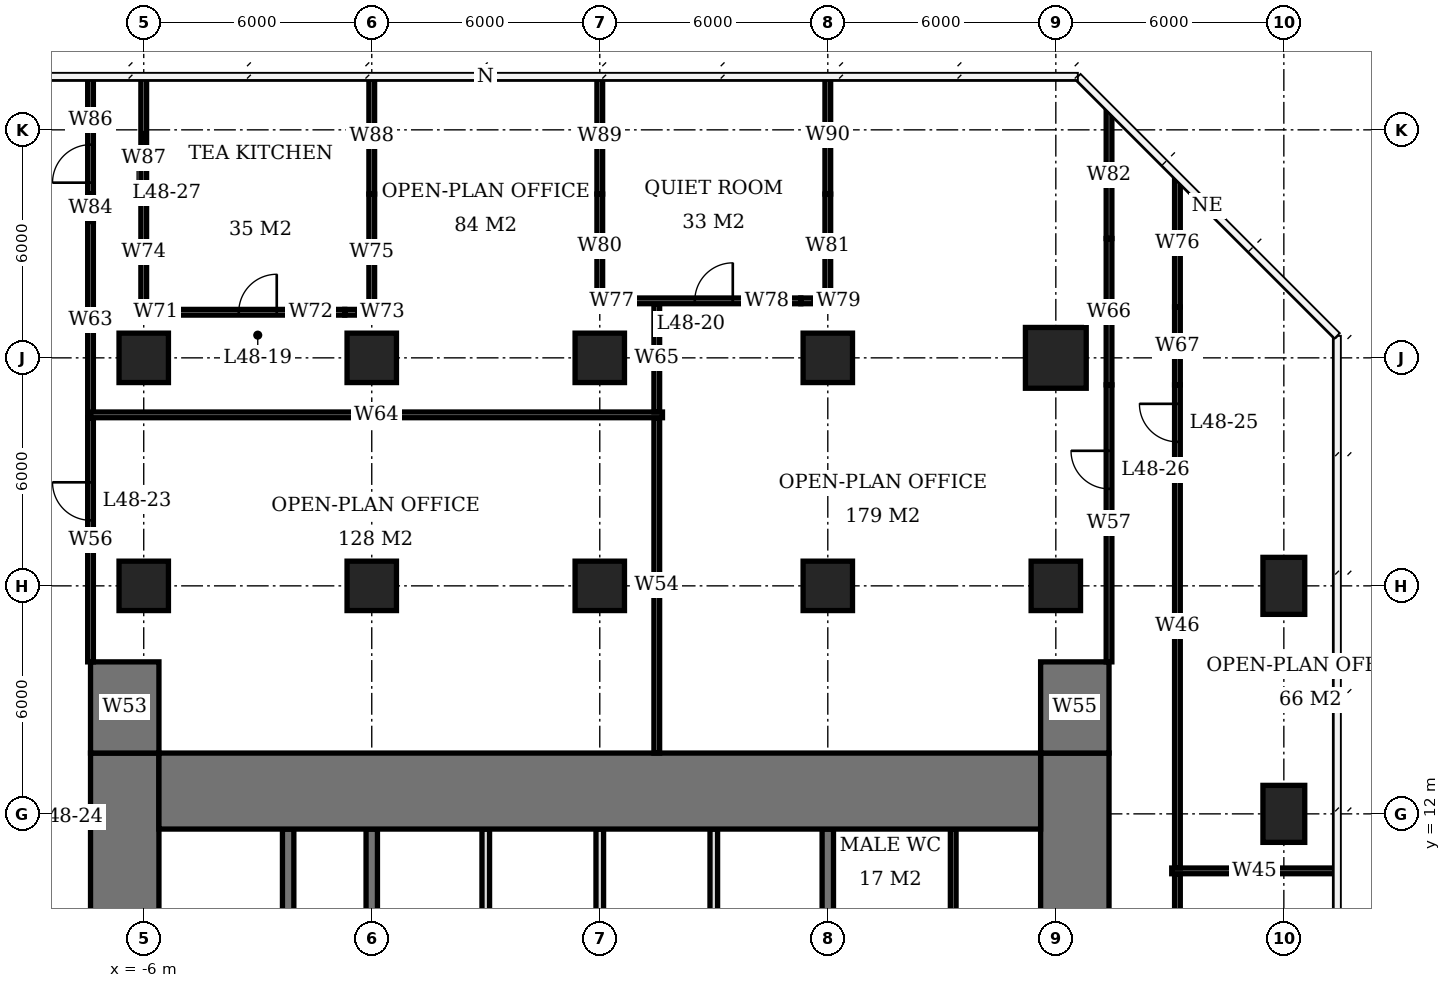
"""IFC4 building model, lengths in metres.
Left out: names, types, materials, properties, quantities, classifications, styles, units other than length and angle.
Written with IfcOpenShell. Run it as: python <this file> out.ifc"""

import sys

from ifc_helpers import new_model, si_unit, direction, frame, frame_2d, origin, origin_2d, place, context, subcontext, project, spatial, rectangle, extrude, element, fill, save


model = new_model("IFC4")
c1 = context("Model", 3, precision=1e-05, world=origin(), true_north=direction((0.0, 1.0)))
c2 = subcontext(c1, "Body", "Model", "MODEL_VIEW")
j1 = project(units=[si_unit("LENGTHUNIT", "METRE"), si_unit("PLANEANGLEUNIT", "RADIAN")], contexts=[c1])
p1 = place(None, origin())
s1 = spatial("IfcSite", under=j1, at=p1, CompositionType="ELEMENT")
p2 = place(p1, origin())
s2 = spatial("IfcBuilding", under=s1, at=p2, CompositionType="ELEMENT")
p3 = place(p2, frame((0.0, 0.0, 196.7)))
s3 = spatial("IfcBuildingStorey", under=s2, at=p3, CompositionType="ELEMENT", Elevation=196.7)
for number, where, z_axis, x_axis in (
    (1, (-6.0, 18.0, 0.0), (0.0, 0.0, 1.0), (1.0, 0.0, 0.0)),
    (2, (-6.0, 24.0, 0.0), (0.0, 0.0, 1.0), (1.0, 0.0, 0.0)),
    (3, (0.0, 18.0, 0.0), (0.0, 0.0, 1.0), (1.0, 0.0, 0.0)),
    (4, (0.0, 24.0, 0.0), (0.0, 0.0, 1.0), (1.0, 0.0, 0.0)),
    (5, (6.0, 18.0, 0.0), (0.0, 0.0, 1.0), (1.0, 0.0, 0.0)),
    (6, (6.0, 24.0, 0.0), (0.0, 0.0, 1.0), (1.0, 0.0, 0.0)),
    (7, (12.0, 18.0, 0.0), (0.0, 0.0, 1.0), (1.0, 0.0, 0.0)),
    (8, (12.0, 24.0, 0.0), (0.0, 0.0, 1.0), (1.0, 0.0, 0.0)),
    (9, (18.0, 18.0, 0.0), (0.0, 0.0, 1.0), (1.0, 0.0, 0.0)),
):
    element("IfcColumn", number, at=place(p3, frame(where, z_axis=z_axis, x_axis=x_axis)), inside=s3, PredefinedType="COLUMN", context=c2, shape_type="SweptSolid", body=[
        extrude(rectangle(XDim=1.3, YDim=1.3, at=origin_2d()), origin(), (0.0, 0.0, 1.0), 3.9),
    ])
p4 = place(p3, frame((18.0, 24.0, 0.0), z_axis=(0.0, 0.0, 1.0), x_axis=(1.0, 0.0, 0.0)))
e10 = element("IfcColumn", 10, at=p4, inside=s3, PredefinedType="COLUMN", context=c2, shape_type="SweptSolid", body=[
    extrude(rectangle(XDim=1.6, YDim=1.6, at=origin_2d()), origin(), (0.0, 0.0, 1.0), 3.9),
])
for number, where, z_axis, x_axis in (
    (11, (24.0, 12.0, 0.0), (0.0, 0.0, 1.0), (0.0, 1.0, 0.0)),
    (12, (24.0, 18.0, 0.0), (0.0, 0.0, 1.0), (0.0, 1.0, 0.0)),
):
    element("IfcColumn", number, at=place(p3, frame(where, z_axis=z_axis, x_axis=x_axis)), inside=s3, PredefinedType="COLUMN", context=c2, shape_type="SweptSolid", body=[
        extrude(rectangle(XDim=1.5, YDim=1.1, at=origin_2d()), origin(), (0.0, 0.0, 1.0), 3.9),
    ])
p5 = place(p3, frame((-5.6, 12.6, 0.0), z_axis=(0.0, 0.0, 1.0), x_axis=(1.0, 0.0, 0.0)))
e13 = element("IfcWall", 13, at=p5, inside=s3, PredefinedType="SHEAR", context=c2, shape_type="SweptSolid", body=[
    extrude(rectangle(XDim=23.2, YDim=2.0, at=frame_2d((11.6, 0.0))), origin(), (0.0, 0.0, 1.0), 3.9),
])
p6 = place(p3, frame((-6.5, -7.6, 0.0), z_axis=(0.0, 0.0, 1.0), x_axis=(0.0, 1.0, 0.0)))
e14 = element("IfcWall", 14, at=p6, inside=s3, PredefinedType="SHEAR", context=c2, shape_type="SweptSolid", body=[
    extrude(rectangle(XDim=21.2, YDim=1.8, at=frame_2d((10.6, 0.0))), origin(), (0.0, 0.0, 1.0), 3.9),
])
p7 = place(p6, frame((7.8, 0.0, 0.0)))
e15 = element("IfcOpeningElement", 15, at=p7, cuts=e14, PredefinedType="OPENING", context=c2, shape_type="SweptSolid", body=[
    extrude(rectangle(XDim=1.8, YDim=2.4, at=frame_2d((0.9, 1.2))), frame((0.0, 0.91, 0.0), z_axis=(0.0, -1.0, 0.0), x_axis=(1.0, 0.0, 0.0)), (0.0, 0.0, 1.0), 1.82),
])
p8 = place(p3, frame((18.5, -7.6, 0.0), z_axis=(0.0, 0.0, 1.0), x_axis=(0.0, 1.0, 0.0)))
e16 = element("IfcWall", 16, at=p8, inside=s3, PredefinedType="SHEAR", context=c2, shape_type="SweptSolid", body=[
    extrude(rectangle(XDim=21.2, YDim=1.8, at=frame_2d((10.6, 0.0))), origin(), (0.0, 0.0, 1.0), 3.9),
])
p9 = place(p8, frame((9.2, 0.0, 0.0)))
e17 = element("IfcOpeningElement", 17, at=p9, cuts=e16, PredefinedType="OPENING", context=c2, shape_type="SweptSolid", body=[
    extrude(rectangle(XDim=1.8, YDim=2.4, at=frame_2d((0.9, 1.2))), frame((0.0, 0.91, 0.0), z_axis=(0.0, -1.0, 0.0), x_axis=(1.0, 0.0, 0.0)), (0.0, 0.0, 1.0), 1.82),
])
for number, where, z_axis, x_axis in (
    (18, (-6.5, 13.6, 0.0), (0.0, 0.0, 1.0), (0.0, 1.0, 0.0)),
    (19, (18.5, 13.6, 0.0), (0.0, 0.0, 1.0), (0.0, 1.0, 0.0)),
):
    element("IfcWall", number, at=place(p3, frame(where, z_axis=z_axis, x_axis=x_axis)), inside=s3, PredefinedType="SHEAR", context=c2, shape_type="SweptSolid", body=[
        extrude(rectangle(XDim=2.4, YDim=1.8, at=frame_2d((1.2, 0.0))), origin(), (0.0, 0.0, 1.0), 3.9),
    ])
p10 = place(p3, frame((0.0, 3.15, 0.0), z_axis=(0.0, 0.0, 1.0), x_axis=(0.0, 1.0, 0.0)))
e20 = element("IfcWall", 20, at=p10, inside=s3, PredefinedType="SHEAR", context=c2, shape_type="SweptSolid", body=[
    extrude(rectangle(XDim=8.45, YDim=0.3, at=frame_2d((4.225, 0.0))), origin(), (0.0, 0.0, 1.0), 3.9),
])
p11 = place(p3, frame((12.0, 6.15, 0.0), z_axis=(0.0, 0.0, 1.0), x_axis=(0.0, 1.0, 0.0)))
e21 = element("IfcWall", 21, at=p11, inside=s3, PredefinedType="SHEAR", context=c2, shape_type="SweptSolid", body=[
    extrude(rectangle(XDim=5.45, YDim=0.3, at=frame_2d((2.725, 0.0))), origin(), (0.0, 0.0, 1.0), 3.9),
])
p12 = place(p3, frame((-2.2, 3.15, 0.0), z_axis=(0.0, 0.0, 1.0), x_axis=(0.0, 1.0, 0.0)))
e22 = element("IfcWall", 22, at=p12, inside=s3, PredefinedType="SHEAR", context=c2, shape_type="SweptSolid", body=[
    extrude(rectangle(XDim=8.45, YDim=0.3, at=frame_2d((4.225, 0.0))), origin(), (0.0, 0.0, 1.0), 3.9),
])
for number, where, z_axis, x_axis in (
    (23, (3.0, 6.15, 0.0), (0.0, 0.0, 1.0), (0.0, 1.0, 0.0)),
    (24, (6.0, 6.15, 0.0), (0.0, 0.0, 1.0), (0.0, 1.0, 0.0)),
    (25, (9.0, 6.15, 0.0), (0.0, 0.0, 1.0), (0.0, 1.0, 0.0)),
):
    element("IfcWall", number, at=place(p3, frame(where, z_axis=z_axis, x_axis=x_axis)), inside=s3, PredefinedType="SOLIDWALL", context=c2, shape_type="SweptSolid", body=[
        extrude(rectangle(XDim=5.45, YDim=0.2, at=frame_2d((2.725, 0.0))), origin(), (0.0, 0.0, 1.0), 3.9),
    ])
p13 = place(p3, frame((15.3, 6.15, 0.0), z_axis=(0.0, 0.0, 1.0), x_axis=(0.0, 1.0, 0.0)))
e26 = element("IfcWall", 26, at=p13, inside=s3, PredefinedType="PLUMBINGWALL", context=c2, shape_type="SweptSolid", body=[
    extrude(rectangle(XDim=5.45, YDim=0.15, at=frame_2d((2.725, 0.0))), origin(), (0.0, 0.0, 1.0), 3.65),
])
p14 = place(p3, frame((-6.075, 25.2, 0.0), z_axis=(0.0, 0.0, 1.0), x_axis=(1.0, 0.0, 0.0)))
e27 = element("IfcWall", 27, at=p14, inside=s3, PredefinedType="PARTITIONING", context=c2, shape_type="SweptSolid", body=[
    extrude(rectangle(XDim=0.785, YDim=0.15, at=frame_2d((0.393, 0.0))), origin(), (0.0, 0.0, 1.0), 2.65),
])
p15 = place(p3, frame((-5.29, 25.2, 0.0), z_axis=(0.0, 0.0, 1.0), x_axis=(1.0, 0.0, 0.0)))
e28 = element("IfcWall", 28, at=p15, inside=s3, PredefinedType="PARTITIONING", context=c2, shape_type="SweptSolid", body=[
    extrude(rectangle(XDim=4.58, YDim=0.15, at=frame_2d((2.29, 0.0))), origin(), (0.0, 0.0, 1.0), 3.65),
])
p16 = place(p15, frame((1.79, 0.0, 0.0)))
e29 = element("IfcOpeningElement", 29, at=p16, cuts=e28, PredefinedType="OPENING", context=c2, shape_type="SweptSolid", body=[
    extrude(rectangle(XDim=1.0, YDim=2.1, at=frame_2d((0.5, 1.05))), frame((0.0, 0.085, 0.0), z_axis=(0.0, -1.0, 0.0), x_axis=(1.0, 0.0, 0.0)), (0.0, 0.0, 1.0), 0.17),
])
for number, where, z_axis, x_axis in (
    (30, (-0.71, 25.2, 0.0), (0.0, 0.0, 1.0), (1.0, 0.0, 0.0)),
    (31, (5.925, 25.5, 0.0), (0.0, 0.0, 1.0), (1.0, 0.0, 0.0)),
):
    element("IfcWall", number, at=place(p3, frame(where, z_axis=z_axis, x_axis=x_axis)), inside=s3, PredefinedType="PARTITIONING", context=c2, shape_type="SweptSolid", body=[
        extrude(rectangle(XDim=0.785, YDim=0.15, at=frame_2d((0.393, 0.0))), origin(), (0.0, 0.0, 1.0), 2.65),
    ])
p17 = place(p3, frame((6.71, 25.5, 0.0), z_axis=(0.0, 0.0, 1.0), x_axis=(1.0, 0.0, 0.0)))
e32 = element("IfcWall", 32, at=p17, inside=s3, PredefinedType="PARTITIONING", context=c2, shape_type="SweptSolid", body=[
    extrude(rectangle(XDim=4.58, YDim=0.15, at=frame_2d((2.29, 0.0))), origin(), (0.0, 0.0, 1.0), 3.65),
])
p18 = place(p17, frame((1.79, 0.0, 0.0)))
e33 = element("IfcOpeningElement", 33, at=p18, cuts=e32, PredefinedType="OPENING", context=c2, shape_type="SweptSolid", body=[
    extrude(rectangle(XDim=1.0, YDim=2.1, at=frame_2d((0.5, 1.05))), frame((0.0, 0.085, 0.0), z_axis=(0.0, -1.0, 0.0), x_axis=(1.0, 0.0, 0.0)), (0.0, 0.0, 1.0), 0.17),
])
p19 = place(p3, frame((11.29, 25.5, 0.0), z_axis=(0.0, 0.0, 1.0), x_axis=(1.0, 0.0, 0.0)))
e34 = element("IfcWall", 34, at=p19, inside=s3, PredefinedType="PARTITIONING", context=c2, shape_type="SweptSolid", body=[
    extrude(rectangle(XDim=0.785, YDim=0.15, at=frame_2d((0.393, 0.0))), origin(), (0.0, 0.0, 1.0), 2.65),
])
p20 = place(p3, frame((-6.0, 25.275, 0.0), z_axis=(0.0, 0.0, 1.0), x_axis=(0.0, 1.0, 0.0)))
e35 = element("IfcWall", 35, at=p20, inside=s3, PredefinedType="PARTITIONING", context=c2, shape_type="SweptSolid", body=[
    extrude(rectangle(XDim=3.035, YDim=0.15, at=frame_2d((1.518, 0.0))), origin(), (0.0, 0.0, 1.0), 2.65),
])
p21 = place(p3, frame((-6.0, 28.31, 0.0), z_axis=(0.0, 0.0, 1.0), x_axis=(0.0, 1.0, 0.0)))
e36 = element("IfcWall", 36, at=p21, inside=s3, PredefinedType="PARTITIONING", context=c2, shape_type="SweptSolid", body=[
    extrude(rectangle(XDim=3.09, YDim=0.15, at=frame_2d((1.545, 0.0))), origin(), (0.0, 0.0, 1.0), 3.65),
])
p22 = place(p3, frame((0.0, 25.275, 0.0), z_axis=(0.0, 0.0, 1.0), x_axis=(0.0, 1.0, 0.0)))
e37 = element("IfcWall", 37, at=p22, inside=s3, PredefinedType="PARTITIONING", context=c2, shape_type="SweptSolid", body=[
    extrude(rectangle(XDim=3.035, YDim=0.15, at=frame_2d((1.518, 0.0))), origin(), (0.0, 0.0, 1.0), 2.65),
])
p23 = place(p3, frame((0.0, 28.31, 0.0), z_axis=(0.0, 0.0, 1.0), x_axis=(0.0, 1.0, 0.0)))
e38 = element("IfcWall", 38, at=p23, inside=s3, PredefinedType="PARTITIONING", context=c2, shape_type="SweptSolid", body=[
    extrude(rectangle(XDim=3.04, YDim=0.15, at=frame_2d((1.52, 0.0))), origin(), (0.0, 0.0, 1.0), 3.65),
])
p24 = place(p3, frame((6.0, 25.575, 0.0), z_axis=(0.0, 0.0, 1.0), x_axis=(0.0, 1.0, 0.0)))
e39 = element("IfcWall", 39, at=p24, inside=s3, PredefinedType="PARTITIONING", context=c2, shape_type="SweptSolid", body=[
    extrude(rectangle(XDim=2.735, YDim=0.15, at=frame_2d((1.368, 0.0))), origin(), (0.0, 0.0, 1.0), 2.65),
])
p25 = place(p3, frame((6.0, 28.31, 0.0), z_axis=(0.0, 0.0, 1.0), x_axis=(0.0, 1.0, 0.0)))
e40 = element("IfcWall", 40, at=p25, inside=s3, PredefinedType="PARTITIONING", context=c2, shape_type="SweptSolid", body=[
    extrude(rectangle(XDim=3.04, YDim=0.15, at=frame_2d((1.52, 0.0))), origin(), (0.0, 0.0, 1.0), 3.65),
])
p26 = place(p3, frame((12.0, 25.575, 0.0), z_axis=(0.0, 0.0, 1.0), x_axis=(0.0, 1.0, 0.0)))
e41 = element("IfcWall", 41, at=p26, inside=s3, PredefinedType="PARTITIONING", context=c2, shape_type="SweptSolid", body=[
    extrude(rectangle(XDim=2.735, YDim=0.15, at=frame_2d((1.368, 0.0))), origin(), (0.0, 0.0, 1.0), 2.65),
])
p27 = place(p3, frame((12.0, 28.31, 0.0), z_axis=(0.0, 0.0, 1.0), x_axis=(0.0, 1.0, 0.0)))
e42 = element("IfcWall", 42, at=p27, inside=s3, PredefinedType="PARTITIONING", context=c2, shape_type="SweptSolid", body=[
    extrude(rectangle(XDim=3.09, YDim=0.15, at=frame_2d((1.545, 0.0))), origin(), (0.0, 0.0, 1.0), 3.65),
])
p28 = place(p3, frame((-7.4, 16.0, 0.0), z_axis=(0.0, 0.0, 1.0), x_axis=(0.0, 1.0, 0.0)))
e43 = element("IfcWall", 43, at=p28, inside=s3, PredefinedType="PARTITIONING", context=c2, shape_type="SweptSolid", body=[
    extrude(rectangle(XDim=6.425, YDim=0.15, at=frame_2d((3.212, 0.0))), origin(), (0.0, 0.0, 1.0), 3.65),
])
p29 = place(p28, frame((3.725, 0.0, 0.0)))
e44 = element("IfcOpeningElement", 44, at=p29, cuts=e43, PredefinedType="OPENING", context=c2, shape_type="SweptSolid", body=[
    extrude(rectangle(XDim=1.0, YDim=2.1, at=frame_2d((0.5, 1.05))), frame((0.0, 0.085, 0.0), z_axis=(0.0, -1.0, 0.0), x_axis=(1.0, 0.0, 0.0)), (0.0, 0.0, 1.0), 0.17),
])
p30 = place(p3, frame((-7.4, 22.425, 0.0), z_axis=(0.0, 0.0, 1.0), x_axis=(0.0, 1.0, 0.0)))
e45 = element("IfcWall", 45, at=p30, inside=s3, PredefinedType="PARTITIONING", context=c2, shape_type="SweptSolid", body=[
    extrude(rectangle(XDim=5.165, YDim=0.15, at=frame_2d((2.583, 0.0))), origin(), (0.0, 0.0, 1.0), 3.65),
])
p31 = place(p3, frame((-7.4, 27.59, 0.0), z_axis=(0.0, 0.0, 1.0), x_axis=(0.0, 1.0, 0.0)))
e46 = element("IfcWall", 46, at=p31, inside=s3, PredefinedType="PARTITIONING", context=c2, shape_type="SweptSolid", body=[
    extrude(rectangle(XDim=0.72, YDim=0.15, at=frame_2d((0.36, 0.0))), origin(), (0.0, 0.0, 1.0), 2.65),
])
p32 = place(p3, frame((-7.4, 28.31, 0.0), z_axis=(0.0, 0.0, 1.0), x_axis=(0.0, 1.0, 0.0)))
e47 = element("IfcWall", 47, at=p32, inside=s3, PredefinedType="PARTITIONING", context=c2, shape_type="SweptSolid", body=[
    extrude(rectangle(XDim=3.09, YDim=0.15, at=frame_2d((1.545, 0.0))), origin(), (0.0, 0.0, 1.0), 3.65),
])
p33 = place(p32, frame((0.3, 0.0, 0.0)))
e48 = element("IfcOpeningElement", 48, at=p33, cuts=e47, PredefinedType="OPENING", context=c2, shape_type="SweptSolid", body=[
    extrude(rectangle(XDim=1.0, YDim=2.1, at=frame_2d((0.5, 1.05))), frame((0.0, 0.085, 0.0), z_axis=(0.0, -1.0, 0.0), x_axis=(1.0, 0.0, 0.0)), (0.0, 0.0, 1.0), 0.17),
])
p34 = place(p3, frame((-7.4, 22.5, 0.0), z_axis=(0.0, 0.0, 1.0), x_axis=(1.0, 0.0, 0.0)))
e49 = element("IfcWall", 49, at=p34, inside=s3, PredefinedType="PARTITIONING", context=c2, shape_type="SweptSolid", body=[
    extrude(rectangle(XDim=15.05, YDim=0.15, at=frame_2d((7.525, 0.0))), origin(), (0.0, 0.0, 1.0), 3.65),
])
p35 = place(p3, frame((7.5, 13.6, 0.0), z_axis=(0.0, 0.0, 1.0), x_axis=(0.0, 1.0, 0.0)))
e50 = element("IfcWall", 50, at=p35, inside=s3, PredefinedType="PARTITIONING", context=c2, shape_type="SweptSolid", body=[
    extrude(rectangle(XDim=8.825, YDim=0.15, at=frame_2d((4.413, 0.0))), origin(), (0.0, 0.0, 1.0), 3.65),
])
p36 = place(p3, frame((7.5, 22.575, 0.0), z_axis=(0.0, 0.0, 1.0), x_axis=(0.0, 1.0, 0.0)))
e51 = element("IfcWall", 51, at=p36, inside=s3, PredefinedType="PARTITIONING", context=c2, shape_type="SweptSolid", body=[
    extrude(rectangle(XDim=2.85, YDim=0.15, at=frame_2d((1.425, 0.0))), origin(), (0.0, 0.0, 1.0), 3.65),
])
p37 = place(p3, frame((19.4, 16.0, 0.0), z_axis=(0.0, 0.0, 1.0), x_axis=(0.0, 1.0, 0.0)))
e52 = element("IfcWall", 52, at=p37, inside=s3, PredefinedType="PARTITIONING", context=c2, shape_type="SweptSolid", body=[
    extrude(rectangle(XDim=7.29, YDim=0.15, at=frame_2d((3.645, 0.0))), origin(), (0.0, 0.0, 1.0), 3.65),
])
p38 = place(p37, frame((4.554, 0.0, 0.0)))
e53 = element("IfcOpeningElement", 53, at=p38, cuts=e52, PredefinedType="OPENING", context=c2, shape_type="SweptSolid", body=[
    extrude(rectangle(XDim=1.0, YDim=2.1, at=frame_2d((0.5, 1.05))), frame((0.0, 0.085, 0.0), z_axis=(0.0, -1.0, 0.0), x_axis=(1.0, 0.0, 0.0)), (0.0, 0.0, 1.0), 0.17),
])
p39 = place(p3, frame((19.4, 23.29, 0.0), z_axis=(0.0, 0.0, 1.0), x_axis=(0.0, 1.0, 0.0)))
e54 = element("IfcWall", 54, at=p39, inside=s3, PredefinedType="PARTITIONING", context=c2, shape_type="SweptSolid", body=[
    extrude(rectangle(XDim=3.85, YDim=0.15, at=frame_2d((1.925, 0.0))), origin(), (0.0, 0.0, 1.0), 2.65),
])
p40 = place(p3, frame((19.4, 27.14, 0.0), z_axis=(0.0, 0.0, 1.0), x_axis=(0.0, 1.0, 0.0)))
e55 = element("IfcWall", 55, at=p40, inside=s3, PredefinedType="PARTITIONING", context=c2, shape_type="SweptSolid", body=[
    extrude(rectangle(XDim=3.349, YDim=0.15, at=frame_2d((1.675, 0.0))), origin(), (0.0, 0.0, 1.0), 3.65),
])
p41 = place(p3, frame((21.2, -10.689, 0.0), z_axis=(0.0, 0.0, 1.0), x_axis=(0.0, 1.0, 0.0)))
e56 = element("IfcWall", 56, at=p41, inside=s3, PredefinedType="PARTITIONING", context=c2, shape_type="SweptSolid", body=[
    extrude(rectangle(XDim=21.114, YDim=0.15, at=frame_2d((10.557, 0.0))), origin(), (0.0, 0.0, 1.0), 3.65),
])
p42 = place(p41, frame((13.29, 0.0, 0.0)))
e57 = element("IfcOpeningElement", 57, at=p42, cuts=e56, PredefinedType="OPENING", context=c2, shape_type="SweptSolid", body=[
    extrude(rectangle(XDim=1.0, YDim=2.1, at=frame_2d((0.5, 1.05))), frame((0.0, 0.085, 0.0), z_axis=(0.0, -1.0, 0.0), x_axis=(1.0, 0.0, 0.0)), (0.0, 0.0, 1.0), 0.17),
])
p43 = place(p3, frame((21.2, 10.575, 0.0), z_axis=(0.0, 0.0, 1.0), x_axis=(0.0, 1.0, 0.0)))
e58 = element("IfcWall", 58, at=p43, inside=s3, PredefinedType="PARTITIONING", context=c2, shape_type="SweptSolid", body=[
    extrude(rectangle(XDim=12.715, YDim=0.15, at=frame_2d((6.357, 0.0))), origin(), (0.0, 0.0, 1.0), 3.65),
])
p44 = place(p43, frame((11.215, 0.0, 0.0)))
e59 = element("IfcOpeningElement", 59, at=p44, cuts=e58, PredefinedType="OPENING", context=c2, shape_type="SweptSolid", body=[
    extrude(rectangle(XDim=1.0, YDim=2.1, at=frame_2d((0.5, 1.05))), frame((0.0, 0.085, 0.0), z_axis=(0.0, -1.0, 0.0), x_axis=(1.0, 0.0, 0.0)), (0.0, 0.0, 1.0), 0.17),
])
p45 = place(p3, frame((21.2, 23.29, 0.0), z_axis=(0.0, 0.0, 1.0), x_axis=(0.0, 1.0, 0.0)))
e60 = element("IfcWall", 60, at=p45, inside=s3, PredefinedType="PARTITIONING", context=c2, shape_type="SweptSolid", body=[
    extrude(rectangle(XDim=2.05, YDim=0.15, at=frame_2d((1.025, 0.0))), origin(), (0.0, 0.0, 1.0), 2.65),
])
p46 = place(p3, frame((21.2, 25.34, 0.0), z_axis=(0.0, 0.0, 1.0), x_axis=(0.0, 1.0, 0.0)))
e61 = element("IfcWall", 61, at=p46, inside=s3, PredefinedType="PARTITIONING", context=c2, shape_type="SweptSolid", body=[
    extrude(rectangle(XDim=3.349, YDim=0.15, at=frame_2d((1.674, 0.0))), origin(), (0.0, 0.0, 1.0), 3.65),
])
p47 = place(p3, frame((21.05, 10.5, 0.0), z_axis=(0.0, 0.0, 1.0), x_axis=(1.0, 0.0, 0.0)))
e62 = element("IfcWall", 62, at=p47, inside=s3, PredefinedType="PARTITIONING", context=c2, shape_type="SweptSolid", body=[
    extrude(rectangle(XDim=4.35, YDim=0.15, at=frame_2d((2.175, 0.0))), origin(), (0.0, 0.0, 1.0), 3.65),
])
p48 = place(p16, origin())
e63 = element("IfcDoor", 63, at=p48, inside=s3, OperationType="SINGLE_SWING_RIGHT", PredefinedType="DOOR", context=c2, shape_type="SweptSolid", body=[
    extrude(rectangle(XDim=1.0, YDim=2.1, at=frame_2d((0.5, 1.05))), frame((0.0, 0.025, 0.0), z_axis=(0.0, -1.0, 0.0), x_axis=(1.0, 0.0, 0.0)), (0.0, 0.0, 1.0), 0.05),
])
fill(e29, e63)
p49 = place(p18, origin())
e64 = element("IfcDoor", 64, at=p49, inside=s3, OperationType="SINGLE_SWING_RIGHT", PredefinedType="DOOR", context=c2, shape_type="SweptSolid", body=[
    extrude(rectangle(XDim=1.0, YDim=2.1, at=frame_2d((0.5, 1.05))), frame((0.0, 0.025, 0.0), z_axis=(0.0, -1.0, 0.0), x_axis=(1.0, 0.0, 0.0)), (0.0, 0.0, 1.0), 0.05),
])
fill(e33, e64)
p50 = place(p29, origin())
e65 = element("IfcDoor", 65, at=p50, inside=s3, OperationType="SINGLE_SWING_RIGHT", PredefinedType="DOOR", context=c2, shape_type="SweptSolid", body=[
    extrude(rectangle(XDim=1.0, YDim=2.1, at=frame_2d((0.5, 1.05))), frame((0.0, 0.025, 0.0), z_axis=(0.0, -1.0, 0.0), x_axis=(1.0, 0.0, 0.0)), (0.0, 0.0, 1.0), 0.05),
])
fill(e44, e65)
p51 = place(p44, origin())
e66 = element("IfcDoor", 66, at=p51, inside=s3, OperationType="SINGLE_SWING_RIGHT", PredefinedType="DOOR", context=c2, shape_type="SweptSolid", body=[
    extrude(rectangle(XDim=1.0, YDim=2.1, at=frame_2d((0.5, 1.05))), frame((0.0, 0.025, 0.0), z_axis=(0.0, -1.0, 0.0), x_axis=(1.0, 0.0, 0.0)), (0.0, 0.0, 1.0), 0.05),
])
fill(e59, e66)
p52 = place(p38, origin())
e67 = element("IfcDoor", 67, at=p52, inside=s3, OperationType="SINGLE_SWING_RIGHT", PredefinedType="DOOR", context=c2, shape_type="SweptSolid", body=[
    extrude(rectangle(XDim=1.0, YDim=2.1, at=frame_2d((0.5, 1.05))), frame((0.0, 0.025, 0.0), z_axis=(0.0, -1.0, 0.0), x_axis=(1.0, 0.0, 0.0)), (0.0, 0.0, 1.0), 0.05),
])
fill(e53, e67)
p53 = place(p33, origin())
e68 = element("IfcDoor", 68, at=p53, inside=s3, OperationType="SINGLE_SWING_LEFT", PredefinedType="DOOR", context=c2, shape_type="SweptSolid", body=[
    extrude(rectangle(XDim=1.0, YDim=2.1, at=frame_2d((0.5, 1.05))), frame((0.0, 0.025, 0.0), z_axis=(0.0, -1.0, 0.0), x_axis=(1.0, 0.0, 0.0)), (0.0, 0.0, 1.0), 0.05),
])
fill(e48, e68)
save(model, sys.argv[1])
